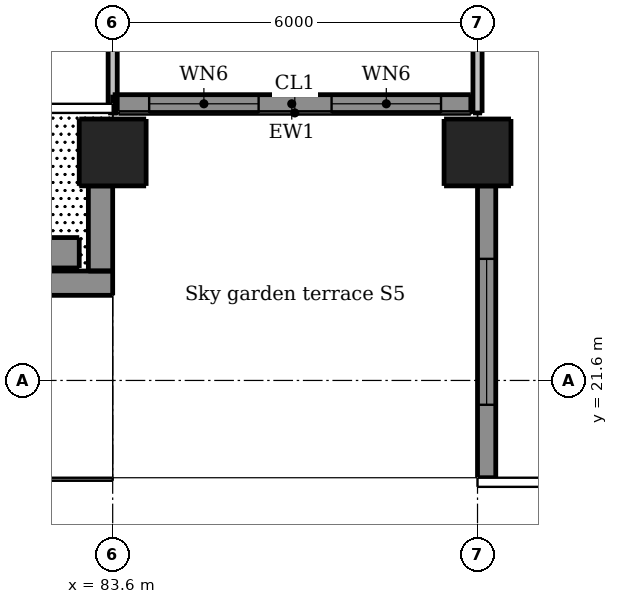
"""IFC4 building model, lengths in metres.
Left out: names, types, materials, properties, quantities, classifications, styles, units other than length and angle.
Written with IfcOpenShell. Run it as: python <this file> out.ifc"""

import sys

from ifc_helpers import new_model, si_unit, direction, frame, frame_2d, origin, origin_2d, place, context, subcontext, project, spatial, rectangle, extrude, element, fill, save


model = new_model("IFC4")
c1 = context("Model", 3, precision=1e-05, world=origin(), true_north=direction((0.0, 1.0)))
c2 = subcontext(c1, "Body", "Model", "MODEL_VIEW")
j1 = project(units=[si_unit("LENGTHUNIT", "METRE"), si_unit("PLANEANGLEUNIT", "RADIAN")], contexts=[c1])
p1 = place(None, origin())
s1 = spatial("IfcSite", under=j1, at=p1, CompositionType="ELEMENT")
p2 = place(p1, origin())
s2 = spatial("IfcBuilding", under=s1, at=p2, CompositionType="ELEMENT")
p3 = place(p2, frame((0.0, 0.0, 108.4)))
s3 = spatial("IfcBuildingStorey", under=s2, at=p3, CompositionType="ELEMENT", Elevation=108.4)
p4 = place(p3, frame((83.6, 25.35, 0.0), z_axis=(0.0, 0.0, 1.0), x_axis=(1.0, 0.0, 0.0)))
e1 = element("IfcColumn", 1, at=p4, inside=s3, PredefinedType="COLUMN", context=c2, shape_type="SweptSolid", body=[
    extrude(rectangle(XDim=1.1, YDim=1.1, at=origin_2d()), origin(), (0.0, 0.0, 1.0), 3.3),
])
p5 = place(p3, frame((89.6, 25.35, 0.0), z_axis=(0.0, 0.0, 1.0), x_axis=(1.0, 0.0, 0.0)))
e2 = element("IfcColumn", 2, at=p5, inside=s3, PredefinedType="COLUMN", context=c2, shape_type="SweptSolid", body=[
    extrude(rectangle(XDim=1.1, YDim=1.1, at=origin_2d()), origin(), (0.0, 0.0, 1.0), 3.05),
])
p6 = place(p3, frame((89.75, 24.8, 0.0), z_axis=(0.0, 0.0, 1.0), x_axis=(0.0, -1.0, 0.0)))
e3 = element("IfcWall", 3, at=p6, inside=s3, PredefinedType="SOLIDWALL", context=c2, shape_type="SweptSolid", body=[
    extrude(rectangle(XDim=4.8, YDim=0.3, at=frame_2d((2.4, 0.0))), origin(), (0.0, 0.0, 1.0), 3.05),
])
p7 = place(p6, frame((1.2, 0.0, 0.15)))
e4 = element("IfcOpeningElement", 4, at=p7, cuts=e3, PredefinedType="OPENING", context=c2, shape_type="SweptSolid", body=[
    extrude(rectangle(XDim=2.4, YDim=2.1, at=frame_2d((1.2, 1.05))), frame((0.0, 0.16, 0.0), z_axis=(0.0, -1.0, 0.0), x_axis=(1.0, 0.0, 0.0)), (0.0, 0.0, 1.0), 0.32),
])
p8 = place(p3, frame((83.6, 26.15, 0.0), z_axis=(0.0, 0.0, 1.0), x_axis=(1.0, 0.0, 0.0)))
e5 = element("IfcWall", 5, at=p8, inside=s3, PredefinedType="SOLIDWALL", context=c2, shape_type="SweptSolid", body=[
    extrude(rectangle(XDim=5.89, YDim=0.3, at=frame_2d((2.945, 0.0))), origin(), (0.0, 0.0, 1.0), 3.05),
])
p9 = place(p8, frame((0.6, 0.0, 0.15)))
e6 = element("IfcOpeningElement", 6, at=p9, cuts=e5, PredefinedType="OPENING", context=c2, shape_type="SweptSolid", body=[
    extrude(rectangle(XDim=1.8, YDim=2.1, at=frame_2d((0.9, 1.05))), frame((0.0, 0.16, 0.0), z_axis=(0.0, -1.0, 0.0), x_axis=(1.0, 0.0, 0.0)), (0.0, 0.0, 1.0), 0.32),
])
p10 = place(p8, frame((3.6, 0.0, 0.15)))
e7 = element("IfcOpeningElement", 7, at=p10, cuts=e5, PredefinedType="OPENING", context=c2, shape_type="SweptSolid", body=[
    extrude(rectangle(XDim=1.8, YDim=2.1, at=frame_2d((0.9, 1.05))), frame((0.0, 0.16, 0.0), z_axis=(0.0, -1.0, 0.0), x_axis=(1.0, 0.0, 0.0)), (0.0, 0.0, 1.0), 0.32),
])
p11 = place(p3, frame((77.6, 23.2, 0.03), z_axis=(0.0, 0.0, 1.0), x_axis=(1.0, 0.0, 0.0)))
e8 = element("IfcWall", 8, at=p11, inside=s3, PredefinedType="PARAPET", context=c2, shape_type="SweptSolid", body=[
    extrude(rectangle(XDim=6.0, YDim=0.4, at=frame_2d((3.0, 0.0))), origin(), (0.0, 0.0, 1.0), 1.1),
])
p12 = place(p3, frame((83.4, 23.4, 0.03), z_axis=(0.0, 0.0, 1.0), x_axis=(0.0, 1.0, 0.0)))
e9 = element("IfcWall", 9, at=p12, inside=s3, PredefinedType="PARAPET", context=c2, shape_type="SweptSolid", body=[
    extrude(rectangle(XDim=1.4, YDim=0.4, at=frame_2d((0.7, 0.0))), origin(), (0.0, 0.0, 1.0), 1.1),
])
p13 = place(p3, frame((78.15, 23.7, 0.03), z_axis=(0.0, 0.0, 1.0), x_axis=(1.0, 0.0, 0.0)))
e10 = element("IfcWall", 10, at=p13, inside=s3, PredefinedType="SOLIDWALL", context=c2, shape_type="SweptSolid", body=[
    extrude(rectangle(XDim=4.9, YDim=0.5, at=frame_2d((2.45, 0.0))), origin(), (0.0, 0.0, 1.0), 0.6),
])
p14 = place(p3, frame((83.6, 26.0, 0.0), z_axis=(0.0, 0.0, 1.0), x_axis=(0.0, 1.0, 0.0)))
e11 = element("IfcWall", 11, at=p14, inside=s3, PredefinedType="PARTITIONING", context=c2, shape_type="SweptSolid", body=[
    extrude(rectangle(XDim=5.625, YDim=0.15, at=frame_2d((2.812, 0.0))), origin(), (0.0, 0.0, 1.0), 2.59),
])
p15 = place(p3, frame((89.6, 26.0, 0.0), z_axis=(0.0, 0.0, 1.0), x_axis=(0.0, 1.0, 0.0)))
e12 = element("IfcWall", 12, at=p15, inside=s3, PredefinedType="PARTITIONING", context=c2, shape_type="SweptSolid", body=[
    extrude(rectangle(XDim=5.775, YDim=0.15, at=frame_2d((2.887, 0.0))), origin(), (0.0, 0.0, 1.0), 2.516),
])
p16 = place(p7, origin())
e13 = element("IfcWindow", 13, at=p16, inside=s3, PartitioningType="DOUBLE_PANEL_VERTICAL", PredefinedType="WINDOW", context=c2, shape_type="SweptSolid", body=[
    extrude(rectangle(XDim=2.4, YDim=2.1, at=frame_2d((1.2, 1.05))), frame((0.0, 0.03, 0.0), z_axis=(0.0, -1.0, 0.0), x_axis=(1.0, 0.0, 0.0)), (0.0, 0.0, 1.0), 0.06),
])
fill(e4, e13)
p17 = place(p9, origin())
e14 = element("IfcWindow", 14, at=p17, inside=s3, PartitioningType="DOUBLE_PANEL_VERTICAL", PredefinedType="WINDOW", context=c2, shape_type="SweptSolid", body=[
    extrude(rectangle(XDim=1.8, YDim=2.1, at=frame_2d((0.9, 1.05))), frame((0.0, 0.03, 0.0), z_axis=(0.0, -1.0, 0.0), x_axis=(1.0, 0.0, 0.0)), (0.0, 0.0, 1.0), 0.06),
])
fill(e6, e14)
p18 = place(p10, origin())
e15 = element("IfcWindow", 15, at=p18, inside=s3, PartitioningType="DOUBLE_PANEL_VERTICAL", PredefinedType="WINDOW", context=c2, shape_type="SweptSolid", body=[
    extrude(rectangle(XDim=1.8, YDim=2.1, at=frame_2d((0.9, 1.05))), frame((0.0, 0.03, 0.0), z_axis=(0.0, -1.0, 0.0), x_axis=(1.0, 0.0, 0.0)), (0.0, 0.0, 1.0), 0.06),
])
fill(e7, e15)
save(model, sys.argv[1])
